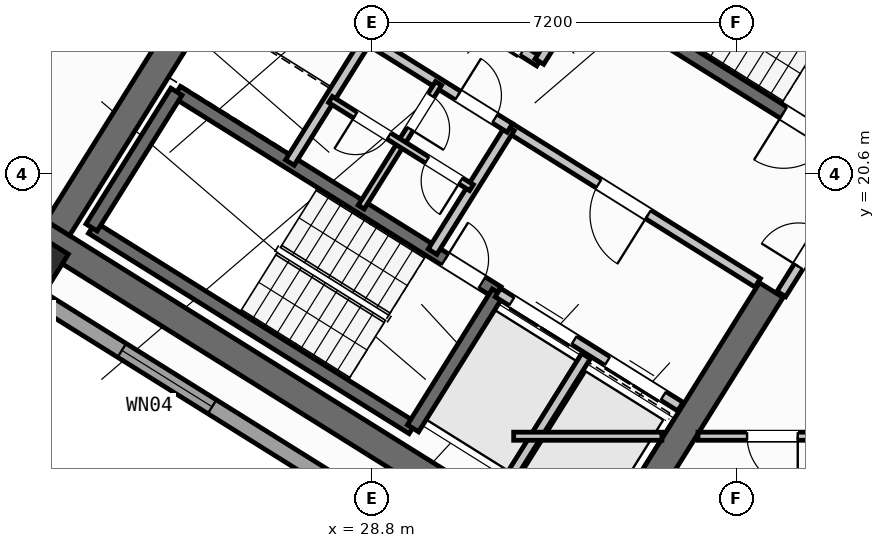
"""IFC4 building model, lengths in metres.
Left out: names, types, materials, properties, quantities, classifications, styles, units other than length and angle.
Written with IfcOpenShell. Run it as: python <this file> out.ifc"""

import sys

from ifc_helpers import new_model, si_unit, direction, frame, frame_2d, origin, origin_2d, place, context, subcontext, project, spatial, rectangle, hollow_rectangle, extrude, source, transform, mapped, element, fill, save


model = new_model("IFC4")
c1 = context("Model", 3, precision=1e-05, world=origin(), true_north=direction((0.0, 1.0)))
c2 = subcontext(c1, "Body", "Model", "MODEL_VIEW")
j1 = project(units=[si_unit("LENGTHUNIT", "METRE"), si_unit("PLANEANGLEUNIT", "RADIAN")], contexts=[c1])
p1 = place(None, origin())
s1 = spatial("IfcSite", under=j1, at=p1, CompositionType="ELEMENT")
p2 = place(p1, origin())
s2 = spatial("IfcBuilding", under=s1, at=p2, CompositionType="ELEMENT")
p3 = place(p2, frame((0.0, 0.0, 108.9)))
s3 = spatial("IfcBuildingStorey", under=s2, at=p3, CompositionType="ELEMENT", Elevation=108.9)
p4 = place(p3, frame((33.366, 12.477, 0.0), z_axis=(0.0, 0.0, 1.0), x_axis=(-0.848047359947, 0.529920442413, 0.0)))
e1 = element("IfcWall", 1, at=p4, inside=s3, PredefinedType="SHEAR", context=c2, shape_type="SweptSolid", body=[
    extrude(rectangle(XDim=13.14, YDim=0.55, at=frame_2d((6.57, 0.0))), origin(), (0.0, 0.0, 1.0), 3.35),
])
p5 = place(p3, frame((36.683, 18.304, 0.0), z_axis=(0.0, 0.0, 1.0), x_axis=(-0.529896466841, -0.848062341122, 0.0)))
e2 = element("IfcWall", 2, at=p5, inside=s3, PredefinedType="SHEAR", context=c2, shape_type="SweptSolid", body=[
    extrude(rectangle(XDim=6.425, YDim=0.55, at=frame_2d((3.212, 0.0))), origin(), (0.0, 0.0, 1.0), 3.35),
])
p6 = place(p3, frame((26.007, 24.976, 0.0), z_axis=(0.0, 0.0, 1.0), x_axis=(-0.529923795287, -0.848045264823, 0.0)))
e3 = element("IfcWall", 3, at=p6, inside=s3, PredefinedType="SHEAR", context=c2, shape_type="SweptSolid", body=[
    extrude(rectangle(XDim=6.425, YDim=0.55, at=frame_2d((3.212, 0.0))), origin(), (0.0, 0.0, 1.0), 3.35),
])
m1 = source(origin(), c2, "Body", "SweptSolid", [
    extrude(hollow_rectangle(XDim=0.9, YDim=0.9, WallThickness=0.036, at=origin_2d()), origin(), (0.0, 0.0, 1.0), 3.6),
])
p7 = place(p3, frame((22.191, 18.87, 0.0), z_axis=(0.0, 0.0, 1.0), x_axis=(-0.848048096156, 0.529919264233, 0.0)))
e4 = element("IfcColumn", 4, at=p7, inside=s3, PredefinedType="COLUMN", context=c2, shape_type="MappedRepresentation", body=[
    mapped(m1, transform((0.0, 0.0, 0.0), scale=1.0)),
])
p8 = place(p3, frame((31.76, 12.183, 0.0), z_axis=(0.0, 0.0, 1.0), x_axis=(-0.848047074256, 0.529920899612, 0.0)))
e5 = element("IfcWall", 5, at=p8, inside=s3, PredefinedType="STANDARD", context=c2, shape_type="SweptSolid", body=[
    extrude(rectangle(XDim=30.652, YDim=0.32, at=frame_2d((15.326, 0.0))), origin(), (0.0, 0.0, 1.0), 3.35),
])
p9 = place(p8, frame((15.153, 0.0, 0.0)))
e6 = element("IfcOpeningElement", 6, at=p9, cuts=e5, PredefinedType="OPENING", context=c2, shape_type="SweptSolid", body=[
    extrude(rectangle(XDim=1.2, YDim=2.15, at=frame_2d((0.6, 1.075))), frame((0.0, 0.17, 0.0), z_axis=(0.0, -1.0, 0.0), x_axis=(1.0, 0.0, 0.0)), (0.0, 0.0, 1.0), 0.34),
])
p10 = place(p8, frame((2.002, 0.0, 0.8)))
e7 = element("IfcOpeningElement", 7, at=p10, cuts=e5, PredefinedType="OPENING", context=c2, shape_type="SweptSolid", body=[
    extrude(rectangle(XDim=2.1, YDim=1.55, at=frame_2d((1.05, 0.775))), frame((0.0, 0.17, 0.0), z_axis=(0.0, -1.0, 0.0), x_axis=(1.0, 0.0, 0.0)), (0.0, 0.0, 1.0), 0.34),
])
p11 = place(p8, frame((7.206, 0.0, 0.8)))
e8 = element("IfcOpeningElement", 8, at=p11, cuts=e5, PredefinedType="OPENING", context=c2, shape_type="SweptSolid", body=[
    extrude(rectangle(XDim=2.1, YDim=1.55, at=frame_2d((1.05, 0.775))), frame((0.0, 0.17, 0.0), z_axis=(0.0, -1.0, 0.0), x_axis=(1.0, 0.0, 0.0)), (0.0, 0.0, 1.0), 0.34),
])
p12 = place(p8, frame((12.648, 0.0, 1.0)))
e9 = element("IfcOpeningElement", 9, at=p12, cuts=e5, PredefinedType="OPENING", context=c2, shape_type="SweptSolid", body=[
    extrude(rectangle(XDim=0.9, YDim=1.25, at=frame_2d((0.45, 0.625))), frame((0.0, 0.17, 0.0), z_axis=(0.0, -1.0, 0.0), x_axis=(1.0, 0.0, 0.0)), (0.0, 0.0, 1.0), 0.34),
])
p13 = place(p8, frame((19.59, 0.0, 0.95)))
e10 = element("IfcOpeningElement", 10, at=p13, cuts=e5, PredefinedType="OPENING", context=c2, shape_type="SweptSolid", body=[
    extrude(rectangle(XDim=1.2, YDim=1.4, at=frame_2d((0.6, 0.7))), frame((0.0, 0.17, 0.0), z_axis=(0.0, -1.0, 0.0), x_axis=(1.0, 0.0, 0.0)), (0.0, 0.0, 1.0), 0.34),
])
p14 = place(p8, frame((25.966, 0.0, 1.0)))
e11 = element("IfcOpeningElement", 11, at=p14, cuts=e5, PredefinedType="OPENING", context=c2, shape_type="SweptSolid", body=[
    extrude(rectangle(XDim=0.9, YDim=1.25, at=frame_2d((0.45, 0.625))), frame((0.0, 0.17, 0.0), z_axis=(0.0, -1.0, 0.0), x_axis=(1.0, 0.0, 0.0)), (0.0, 0.0, 1.0), 0.34),
])
p15 = place(p8, frame((28.871, 0.0, 1.0)))
e12 = element("IfcOpeningElement", 12, at=p15, cuts=e5, PredefinedType="OPENING", context=c2, shape_type="SweptSolid", body=[
    extrude(rectangle(XDim=0.9, YDim=1.25, at=frame_2d((0.45, 0.625))), frame((0.0, 0.17, 0.0), z_axis=(0.0, -1.0, 0.0), x_axis=(1.0, 0.0, 0.0)), (0.0, 0.0, 1.0), 0.34),
])
p16 = place(p3, frame((29.605, 15.581, 0.0), z_axis=(0.0, 0.0, 1.0), x_axis=(-0.848036911448, 0.529937163087, 0.0)))
e13 = element("IfcWall", 13, at=p16, inside=s3, PredefinedType="SHEAR", context=c2, shape_type="SweptSolid", body=[
    extrude(rectangle(XDim=7.46, YDim=0.26, at=frame_2d((3.73, 0.0))), origin(), (0.0, 0.0, 1.0), 3.35),
])
p17 = place(p3, frame((31.28, 18.261, 0.0), z_axis=(0.0, 0.0, 1.0), x_axis=(-0.848051618787, 0.529913626805, 0.0)))
e14 = element("IfcWall", 14, at=p17, inside=s3, PredefinedType="SHEAR", context=c2, shape_type="SweptSolid", body=[
    extrude(rectangle(XDim=7.46, YDim=0.26, at=frame_2d((3.73, 0.0))), origin(), (0.0, 0.0, 1.0), 3.35),
])
p18 = place(p17, frame((0.36, 0.0, 0.0)))
e15 = element("IfcOpeningElement", 15, at=p18, cuts=e14, PredefinedType="OPENING", context=c2, shape_type="SweptSolid", body=[
    extrude(rectangle(XDim=0.86, YDim=2.05, at=frame_2d((0.43, 1.025))), frame((0.0, 0.14, 0.0), z_axis=(0.0, -1.0, 0.0), x_axis=(1.0, 0.0, 0.0)), (0.0, 0.0, 1.0), 0.28),
])
p19 = place(p3, frame((31.288, 18.256, 0.0), z_axis=(0.0, 0.0, 1.0), x_axis=(-0.529943379326, -0.848033026897, 0.0)))
e16 = element("IfcWall", 16, at=p19, inside=s3, PredefinedType="SHEAR", context=c2, shape_type="SweptSolid", body=[
    extrude(rectangle(XDim=3.16, YDim=0.26, at=frame_2d((1.58, 0.0))), origin(), (0.0, 0.0, 1.0), 3.35),
])
p20 = place(p3, frame((24.945, 22.22, 0.0), z_axis=(0.0, 0.0, 1.0), x_axis=(-0.529908658664, -0.84805472316, 0.0)))
e17 = element("IfcWall", 17, at=p20, inside=s3, PredefinedType="SHEAR", context=c2, shape_type="SweptSolid", body=[
    extrude(rectangle(XDim=3.16, YDim=0.26, at=frame_2d((1.58, 0.0))), origin(), (0.0, 0.0, 1.0), 3.35),
])
p21 = place(p3, frame((38.046, 21.108, 0.0), z_axis=(0.0, 0.0, 1.0), x_axis=(-0.848054434086, 0.529909121291, 0.0)))
e18 = element("IfcWall", 18, at=p21, inside=s3, PredefinedType="SHEAR", context=c2, shape_type="SweptSolid", body=[
    extrude(rectangle(XDim=7.33, YDim=0.26, at=frame_2d((3.665, 0.0))), origin(), (0.0, 0.0, 1.0), 3.35),
])
p22 = place(p21, frame((0.22, 0.0, 0.0)))
e19 = element("IfcOpeningElement", 19, at=p22, cuts=e18, PredefinedType="OPENING", context=c2, shape_type="SweptSolid", body=[
    extrude(rectangle(XDim=1.1, YDim=2.1, at=frame_2d((0.55, 1.05))), frame((0.0, 0.14, 0.0), z_axis=(0.0, -1.0, 0.0), x_axis=(1.0, 0.0, 0.0)), (0.0, 0.0, 1.0), 0.28),
])
p23 = place(p3, frame((34.891, 16.005, 0.0), z_axis=(0.0, 0.0, 1.0), x_axis=(-0.848062873452, 0.529895614884, 0.0)))
e20 = element("IfcWall", 20, at=p23, inside=s3, PredefinedType="STANDARD", context=c2, shape_type="SweptSolid", body=[
    extrude(rectangle(XDim=4.248, YDim=0.2, at=frame_2d((2.124, 0.0))), origin(), (0.0, 0.0, 1.0), 3.34),
])
p24 = place(p23, frame((0.398, 0.0, 0.0)))
e21 = element("IfcOpeningElement", 21, at=p24, cuts=e20, PredefinedType="OPENING", context=c2, shape_type="SweptSolid", body=[
    extrude(rectangle(XDim=1.3, YDim=2.2, at=frame_2d((0.65, 1.1))), frame((0.0, 0.11, 0.0), z_axis=(0.0, -1.0, 0.0), x_axis=(1.0, 0.0, 0.0)), (0.0, 0.0, 1.0), 0.22),
])
p25 = place(p23, frame((2.473, 0.0, 0.0)))
e22 = element("IfcOpeningElement", 22, at=p25, cuts=e20, PredefinedType="OPENING", context=c2, shape_type="SweptSolid", body=[
    extrude(rectangle(XDim=1.45, YDim=2.25, at=frame_2d((0.725, 1.125))), frame((0.0, 0.11, 0.0), z_axis=(0.0, -1.0, 0.0), x_axis=(1.0, 0.0, 0.0)), (0.0, 0.0, 1.0), 0.22),
])
p26 = place(p3, frame((36.417, 18.447, 0.0), z_axis=(0.0, 0.0, 1.0), x_axis=(-0.848064879198, 0.529892404805, 0.0)))
e23 = element("IfcWall", 23, at=p26, inside=s3, PredefinedType="STANDARD", context=c2, shape_type="SweptSolid", body=[
    extrude(rectangle(XDim=5.768, YDim=0.2, at=frame_2d((2.884, 0.0))), origin(), (0.0, 0.0, 1.0), 3.34),
])
p27 = place(p26, frame((2.548, 0.0, 0.0)))
e24 = element("IfcOpeningElement", 24, at=p27, cuts=e23, PredefinedType="OPENING", context=c2, shape_type="SweptSolid", body=[
    extrude(rectangle(XDim=1.15, YDim=2.1, at=frame_2d((0.575, 1.05))), frame((0.0, 0.11, 0.0), z_axis=(0.0, -1.0, 0.0), x_axis=(1.0, 0.0, 0.0)), (0.0, 0.0, 1.0), 0.22),
])
p28 = place(p3, frame((32.108, 22.814, 0.0), z_axis=(0.0, 0.0, 1.0), x_axis=(-0.848042229521, 0.529928652696, 0.0)))
e25 = element("IfcWall", 25, at=p28, inside=s3, PredefinedType="STANDARD", context=c2, shape_type="SweptSolid", body=[
    extrude(rectangle(XDim=5.62, YDim=0.2, at=frame_2d((2.81, 0.0))), origin(), (0.0, 0.0, 1.0), 3.34),
])
p29 = place(p28, frame((0.39, 0.0, 0.0)))
e26 = element("IfcOpeningElement", 26, at=p29, cuts=e25, PredefinedType="OPENING", context=c2, shape_type="SweptSolid", body=[
    extrude(rectangle(XDim=1.1, YDim=2.15, at=frame_2d((0.55, 1.075))), frame((0.0, 0.11, 0.0), z_axis=(0.0, -1.0, 0.0), x_axis=(1.0, 0.0, 0.0)), (0.0, 0.0, 1.0), 0.22),
])
p30 = place(p28, frame((2.25, 0.0, 0.0)))
e27 = element("IfcOpeningElement", 27, at=p30, cuts=e25, PredefinedType="OPENING", context=c2, shape_type="SweptSolid", body=[
    extrude(rectangle(XDim=1.1, YDim=2.15, at=frame_2d((0.55, 1.075))), frame((0.0, 0.11, 0.0), z_axis=(0.0, -1.0, 0.0), x_axis=(1.0, 0.0, 0.0)), (0.0, 0.0, 1.0), 0.22),
])
p31 = place(p28, frame((4.11, 0.0, 0.0)))
e28 = element("IfcOpeningElement", 28, at=p31, cuts=e25, PredefinedType="OPENING", context=c2, shape_type="SweptSolid", body=[
    extrude(rectangle(XDim=1.1, YDim=2.15, at=frame_2d((0.55, 1.075))), frame((0.0, 0.11, 0.0), z_axis=(0.0, -1.0, 0.0), x_axis=(1.0, 0.0, 0.0)), (0.0, 0.0, 1.0), 0.22),
])
p32 = place(p3, frame((32.982, 24.213, 0.0), z_axis=(0.0, 0.0, 1.0), x_axis=(-0.529839334948, -0.84809803628, 0.0)))
e29 = element("IfcWall", 29, at=p32, inside=s3, PredefinedType="STANDARD", context=c2, shape_type="SweptSolid", body=[
    extrude(rectangle(XDim=1.65, YDim=0.2, at=frame_2d((0.825, 0.0))), origin(), (0.0, 0.0, 1.0), 3.34),
])
p33 = place(p3, frame((33.029, 17.003, 0.0), z_axis=(0.0, 0.0, 1.0), x_axis=(-0.529916267533, -0.848049968695, 0.0)))
e30 = element("IfcWall", 30, at=p33, inside=s3, PredefinedType="STANDARD", context=c2, shape_type="SweptSolid", body=[
    extrude(rectangle(XDim=2.92, YDim=0.2, at=frame_2d((1.46, 0.0))), origin(), (0.0, 0.0, 1.0), 3.34),
])
for number, where, z_axis, x_axis in (
    (31, (31.525, 21.504, 0.0), (0.0, 0.0, 1.0), (-0.53, -0.848, 0.0)),
    (32, (28.71, 23.263, 0.0), (0.0, 0.0, 1.0), (-0.53, -0.848, 0.0)),
):
    element("IfcWall", number, at=place(p3, frame(where, z_axis=z_axis, x_axis=x_axis)), inside=s3, PredefinedType="STANDARD", context=c2, shape_type="SweptSolid", body=[
        extrude(rectangle(XDim=2.88, YDim=0.2, at=frame_2d((1.44, 0.0))), origin(), (0.0, 0.0, 1.0), 3.34),
    ])
p34 = place(p3, frame((31.525, 21.504, 0.0), z_axis=(0.0, 0.0, 1.0), x_axis=(-0.848040211232, 0.529931882541, 0.0)))
e33 = element("IfcWall", 33, at=p34, inside=s3, PredefinedType="STANDARD", context=c2, shape_type="SweptSolid", body=[
    extrude(rectangle(XDim=6.218, YDim=0.2, at=frame_2d((3.109, 0.0))), origin(), (0.0, 0.0, 1.0), 3.34),
])
p35 = place(p34, frame((4.4, 0.0, 0.0)))
e34 = element("IfcOpeningElement", 34, at=p35, cuts=e33, PredefinedType="OPENING", context=c2, shape_type="SweptSolid", body=[
    extrude(rectangle(XDim=0.86, YDim=2.05, at=frame_2d((0.43, 1.025))), frame((0.0, 0.11, 0.0), z_axis=(0.0, -1.0, 0.0), x_axis=(1.0, 0.0, 0.0)), (0.0, 0.0, 1.0), 0.22),
])
p36 = place(p34, frame((0.35, 0.0, 0.0)))
e35 = element("IfcOpeningElement", 35, at=p36, cuts=e33, PredefinedType="OPENING", context=c2, shape_type="SweptSolid", body=[
    extrude(rectangle(XDim=0.86, YDim=2.05, at=frame_2d((0.43, 1.025))), frame((0.0, 0.11, 0.0), z_axis=(0.0, -1.0, 0.0), x_axis=(1.0, 0.0, 0.0)), (0.0, 0.0, 1.0), 0.22),
])
p37 = place(p3, frame((30.117, 22.384, 0.0), z_axis=(0.0, 0.0, 1.0), x_axis=(-0.529951914384, -0.848027693204, 0.0)))
e36 = element("IfcWall", 36, at=p37, inside=s3, PredefinedType="PLUMBINGWALL", context=c2, shape_type="SweptSolid", body=[
    extrude(rectangle(XDim=1.4, YDim=0.14, at=frame_2d((0.7, 0.0))), origin(), (0.0, 0.0, 1.0), 3.34),
])
p38 = place(p37, frame((0.28, 0.0, 0.0)))
e37 = element("IfcOpeningElement", 37, at=p38, cuts=e36, PredefinedType="OPENING", context=c2, shape_type="SweptSolid", body=[
    extrude(rectangle(XDim=0.78, YDim=2.05, at=frame_2d((0.39, 1.025))), frame((0.0, 0.08, 0.0), z_axis=(0.0, -1.0, 0.0), x_axis=(1.0, 0.0, 0.0)), (0.0, 0.0, 1.0), 0.16),
])
p39 = place(p3, frame((29.375, 21.196, 0.0), z_axis=(0.0, 0.0, 1.0), x_axis=(-0.529865479138, -0.848081702443, 0.0)))
e38 = element("IfcWall", 38, at=p39, inside=s3, PredefinedType="PLUMBINGWALL", context=c2, shape_type="SweptSolid", body=[
    extrude(rectangle(XDim=1.48, YDim=0.14, at=frame_2d((0.74, 0.0))), origin(), (0.0, 0.0, 1.0), 3.34),
])
p40 = place(p3, frame((30.766, 20.327, 0.0), z_axis=(0.0, 0.0, 1.0), x_axis=(-0.848052663127, 0.529911955482, 0.0)))
e39 = element("IfcWall", 39, at=p40, inside=s3, PredefinedType="PLUMBINGWALL", context=c2, shape_type="SweptSolid", body=[
    extrude(rectangle(XDim=3.28, YDim=0.14, at=frame_2d((1.64, 0.0))), origin(), (0.0, 0.0, 1.0), 3.34),
])
p41 = place(p40, frame((0.25, 0.0, 0.0)))
e40 = element("IfcOpeningElement", 40, at=p41, cuts=e39, PredefinedType="OPENING", context=c2, shape_type="SweptSolid", body=[
    extrude(rectangle(XDim=0.78, YDim=2.05, at=frame_2d((0.39, 1.025))), frame((0.0, 0.08, 0.0), z_axis=(0.0, -1.0, 0.0), x_axis=(1.0, 0.0, 0.0)), (0.0, 0.0, 1.0), 0.16),
])
p42 = place(p40, frame((1.92, 0.0, 0.0)))
e41 = element("IfcOpeningElement", 41, at=p42, cuts=e39, PredefinedType="OPENING", context=c2, shape_type="SweptSolid", body=[
    extrude(rectangle(XDim=0.78, YDim=2.05, at=frame_2d((0.39, 1.025))), frame((0.0, 0.08, 0.0), z_axis=(0.0, -1.0, 0.0), x_axis=(1.0, 0.0, 0.0)), (0.0, 0.0, 1.0), 0.16),
])
p43 = place(p3, frame((23.899, 26.529, 0.0), z_axis=(0.0, 0.0, 1.0), x_axis=(-0.529920662441, -0.848047222457, 0.0)))
e42 = element("IfcWall", 42, at=p43, inside=s3, PredefinedType="PARTITIONING", context=c2, shape_type="SweptSolid", body=[
    extrude(rectangle(XDim=7.85, YDim=0.16, at=frame_2d((3.925, 0.0))), origin(), (0.0, 0.0, 1.0), 3.34),
])
p44 = place(p3, frame((38.451, 20.737, 0.0), z_axis=(0.0, 0.0, 1.0), x_axis=(-0.529924799939, -0.848044637038, 0.0)))
e43 = element("IfcWall", 43, at=p44, inside=s3, PredefinedType="STANDARD", context=c2, shape_type="SweptSolid", body=[
    extrude(rectangle(XDim=2.96, YDim=0.2, at=frame_2d((1.48, 0.0))), origin(), (0.0, 0.0, 1.0), 3.34),
])
p45 = place(p44, frame((1.46, 0.0, 0.0)))
e44 = element("IfcOpeningElement", 44, at=p45, cuts=e43, PredefinedType="OPENING", context=c2, shape_type="SweptSolid", body=[
    extrude(rectangle(XDim=0.86, YDim=2.05, at=frame_2d((0.43, 1.025))), frame((0.0, 0.11, 0.0), z_axis=(0.0, -1.0, 0.0), x_axis=(1.0, 0.0, 0.0)), (0.0, 0.0, 1.0), 0.22),
])
p46 = place(p3, frame((31.6, 15.42, 0.0), z_axis=(0.0, 0.0, 1.0), x_axis=(1.0, 0.0, 0.0)))
e45 = element("IfcWall", 45, at=p46, inside=s3, PredefinedType="PARTITIONING", context=c2, shape_type="SweptSolid", body=[
    extrude(rectangle(XDim=2.925, YDim=0.16, at=frame_2d((1.462, 0.0))), origin(), (0.0, 0.0, 1.0), 3.34),
])
p47 = place(p3, frame((35.237, 15.42, 0.0), z_axis=(0.0, 0.0, 1.0), x_axis=(1.0, 0.0, 0.0)))
e46 = element("IfcWall", 46, at=p47, inside=s3, PredefinedType="PARTITIONING", context=c2, shape_type="SweptSolid", body=[
    extrude(rectangle(XDim=15.432, YDim=0.16, at=frame_2d((7.716, 0.0))), origin(), (0.0, 0.0, 1.0), 3.34),
])
p48 = place(p47, frame((0.969, 0.0, 0.0)))
e47 = element("IfcOpeningElement", 47, at=p48, cuts=e46, PredefinedType="OPENING", context=c2, shape_type="SweptSolid", body=[
    extrude(rectangle(XDim=1.0, YDim=2.1, at=frame_2d((0.5, 1.05))), frame((0.0, 0.09, 0.0), z_axis=(0.0, -1.0, 0.0), x_axis=(1.0, 0.0, 0.0)), (0.0, 0.0, 1.0), 0.18),
])
p49 = place(p47, frame((8.799, 0.0, 0.0)))
e48 = element("IfcOpeningElement", 48, at=p49, cuts=e46, PredefinedType="OPENING", context=c2, shape_type="SweptSolid", body=[
    extrude(rectangle(XDim=1.0, YDim=2.1, at=frame_2d((0.5, 1.05))), frame((0.0, 0.09, 0.0), z_axis=(0.0, -1.0, 0.0), x_axis=(1.0, 0.0, 0.0)), (0.0, 0.0, 1.0), 0.18),
])
m2 = source(origin(), c2, "Body", "SweptSolid", [
    extrude(rectangle(XDim=2.1, YDim=1.55, at=frame_2d((1.05, 0.775))), frame((0.0, 0.03, 0.0), z_axis=(0.0, -1.0, 0.0), x_axis=(1.0, 0.0, 0.0)), (0.0, 0.0, 1.0), 0.06),
])
p50 = place(p11, origin())
e49 = element("IfcWindow", 49, at=p50, inside=s3, PartitioningType="SINGLE_PANEL", PredefinedType="WINDOW", context=c2, shape_type="MappedRepresentation", body=[
    mapped(m2, transform((0.0, 0.0, 0.0), scale=1.0)),
])
fill(e8, e49)
m3 = source(origin(), c2, "Body", "SweptSolid", [
    extrude(rectangle(XDim=0.86, YDim=2.05, at=frame_2d((0.43, 1.025))), frame((0.0, 0.025, 0.0), z_axis=(0.0, -1.0, 0.0), x_axis=(1.0, 0.0, 0.0)), (0.0, 0.0, 1.0), 0.05),
])
p51 = place(p18, frame((0.86, 0.0, 0.0), z_axis=(0.0, 0.0, 1.0), x_axis=(-1.0, 0.0, 0.0)))
e50 = element("IfcDoor", 50, at=p51, inside=s3, OperationType="SINGLE_SWING_LEFT", PredefinedType="DOOR", context=c2, shape_type="MappedRepresentation", body=[
    mapped(m3, transform((0.0, 0.0, 0.0), scale=1.0)),
])
fill(e15, e50)
m4 = source(origin(), c2, "Body", "SweptSolid", [
    extrude(rectangle(XDim=1.1, YDim=2.1, at=frame_2d((0.55, 1.05))), frame((0.0, 0.025, 0.0), z_axis=(0.0, -1.0, 0.0), x_axis=(1.0, 0.0, 0.0)), (0.0, 0.0, 1.0), 0.05),
])
p52 = place(p22, origin())
e51 = element("IfcDoor", 51, at=p52, inside=s3, OperationType="SINGLE_SWING_RIGHT", PredefinedType="DOOR", context=c2, shape_type="MappedRepresentation", body=[
    mapped(m4, transform((0.0, 0.0, 0.0), scale=1.0)),
])
fill(e19, e51)
m5 = source(origin(), c2, "Body", "SweptSolid", [
    extrude(rectangle(XDim=1.15, YDim=2.1, at=frame_2d((0.575, 1.05))), frame((0.0, 0.025, 0.0), z_axis=(0.0, -1.0, 0.0), x_axis=(1.0, 0.0, 0.0)), (0.0, 0.0, 1.0), 0.05),
])
p53 = place(p27, origin())
e52 = element("IfcDoor", 52, at=p53, inside=s3, OperationType="SINGLE_SWING_LEFT", PredefinedType="DOOR", context=c2, shape_type="MappedRepresentation", body=[
    mapped(m5, transform((0.0, 0.0, 0.0), scale=1.0)),
])
fill(e24, e52)
m6 = source(origin(), c2, "Body", "SweptSolid", [
    extrude(rectangle(XDim=1.3, YDim=2.2, at=frame_2d((0.65, 1.1))), frame((0.0, 0.025, 0.0), z_axis=(0.0, -1.0, 0.0), x_axis=(1.0, 0.0, 0.0)), (0.0, 0.0, 1.0), 0.05),
])
p54 = place(p24, origin())
e53 = element("IfcDoor", 53, at=p54, inside=s3, OperationType="DOUBLE_DOOR_SLIDING", PredefinedType="DOOR", context=c2, shape_type="MappedRepresentation", body=[
    mapped(m6, transform((0.0, 0.0, 0.0), scale=1.0)),
])
fill(e21, e53)
m7 = source(origin(), c2, "Body", "SweptSolid", [
    extrude(rectangle(XDim=1.45, YDim=2.25, at=frame_2d((0.725, 1.125))), frame((0.0, 0.025, 0.0), z_axis=(0.0, -1.0, 0.0), x_axis=(1.0, 0.0, 0.0)), (0.0, 0.0, 1.0), 0.05),
])
p55 = place(p25, origin())
e54 = element("IfcDoor", 54, at=p55, inside=s3, OperationType="DOUBLE_DOOR_SLIDING", PredefinedType="DOOR", context=c2, shape_type="MappedRepresentation", body=[
    mapped(m7, transform((0.0, 0.0, 0.0), scale=1.0)),
])
fill(e22, e54)
p56 = place(p36, frame((0.86, 0.0, 0.0), z_axis=(0.0, 0.0, 1.0), x_axis=(-1.0, 0.0, 0.0)))
e55 = element("IfcDoor", 55, at=p56, inside=s3, OperationType="SINGLE_SWING_LEFT", PredefinedType="DOOR", context=c2, shape_type="MappedRepresentation", body=[
    mapped(m3, transform((0.0, 0.0, 0.0), scale=1.0)),
])
fill(e35, e55)
m8 = source(origin(), c2, "Body", "SweptSolid", [
    extrude(rectangle(XDim=0.78, YDim=2.05, at=frame_2d((0.39, 1.025))), frame((0.0, 0.025, 0.0), z_axis=(0.0, -1.0, 0.0), x_axis=(1.0, 0.0, 0.0)), (0.0, 0.0, 1.0), 0.05),
])
p57 = place(p38, origin())
e56 = element("IfcDoor", 56, at=p57, inside=s3, OperationType="SINGLE_SWING_RIGHT", PredefinedType="DOOR", context=c2, shape_type="MappedRepresentation", body=[
    mapped(m8, transform((0.0, 0.0, 0.0), scale=1.0)),
])
fill(e37, e56)
p58 = place(p41, origin())
e57 = element("IfcDoor", 57, at=p58, inside=s3, OperationType="SINGLE_SWING_LEFT", PredefinedType="DOOR", context=c2, shape_type="MappedRepresentation", body=[
    mapped(m8, transform((0.0, 0.0, 0.0), scale=1.0)),
])
fill(e40, e57)
p59 = place(p42, origin())
e58 = element("IfcDoor", 58, at=p59, inside=s3, OperationType="SINGLE_SWING_RIGHT", PredefinedType="DOOR", context=c2, shape_type="MappedRepresentation", body=[
    mapped(m8, transform((0.0, 0.0, 0.0), scale=1.0)),
])
fill(e41, e58)
p60 = place(p45, frame((0.86, 0.0, 0.0), z_axis=(0.0, 0.0, 1.0), x_axis=(-1.0, 0.0, 0.0)))
e59 = element("IfcDoor", 59, at=p60, inside=s3, OperationType="SINGLE_SWING_LEFT", PredefinedType="DOOR", context=c2, shape_type="MappedRepresentation", body=[
    mapped(m3, transform((0.0, 0.0, 0.0), scale=1.0)),
])
fill(e44, e59)
m9 = source(origin(), c2, "Body", "SweptSolid", [
    extrude(rectangle(XDim=1.0, YDim=2.1, at=frame_2d((0.5, 1.05))), frame((0.0, 0.025, 0.0), z_axis=(0.0, -1.0, 0.0), x_axis=(1.0, 0.0, 0.0)), (0.0, 0.0, 1.0), 0.05),
])
p61 = place(p48, frame((1.0, 0.0, 0.0), z_axis=(0.0, 0.0, 1.0), x_axis=(-1.0, 0.0, 0.0)))
e60 = element("IfcDoor", 60, at=p61, inside=s3, OperationType="SINGLE_SWING_LEFT", PredefinedType="DOOR", context=c2, shape_type="MappedRepresentation", body=[
    mapped(m9, transform((0.0, 0.0, 0.0), scale=1.0)),
])
fill(e47, e60)
save(model, sys.argv[1])
